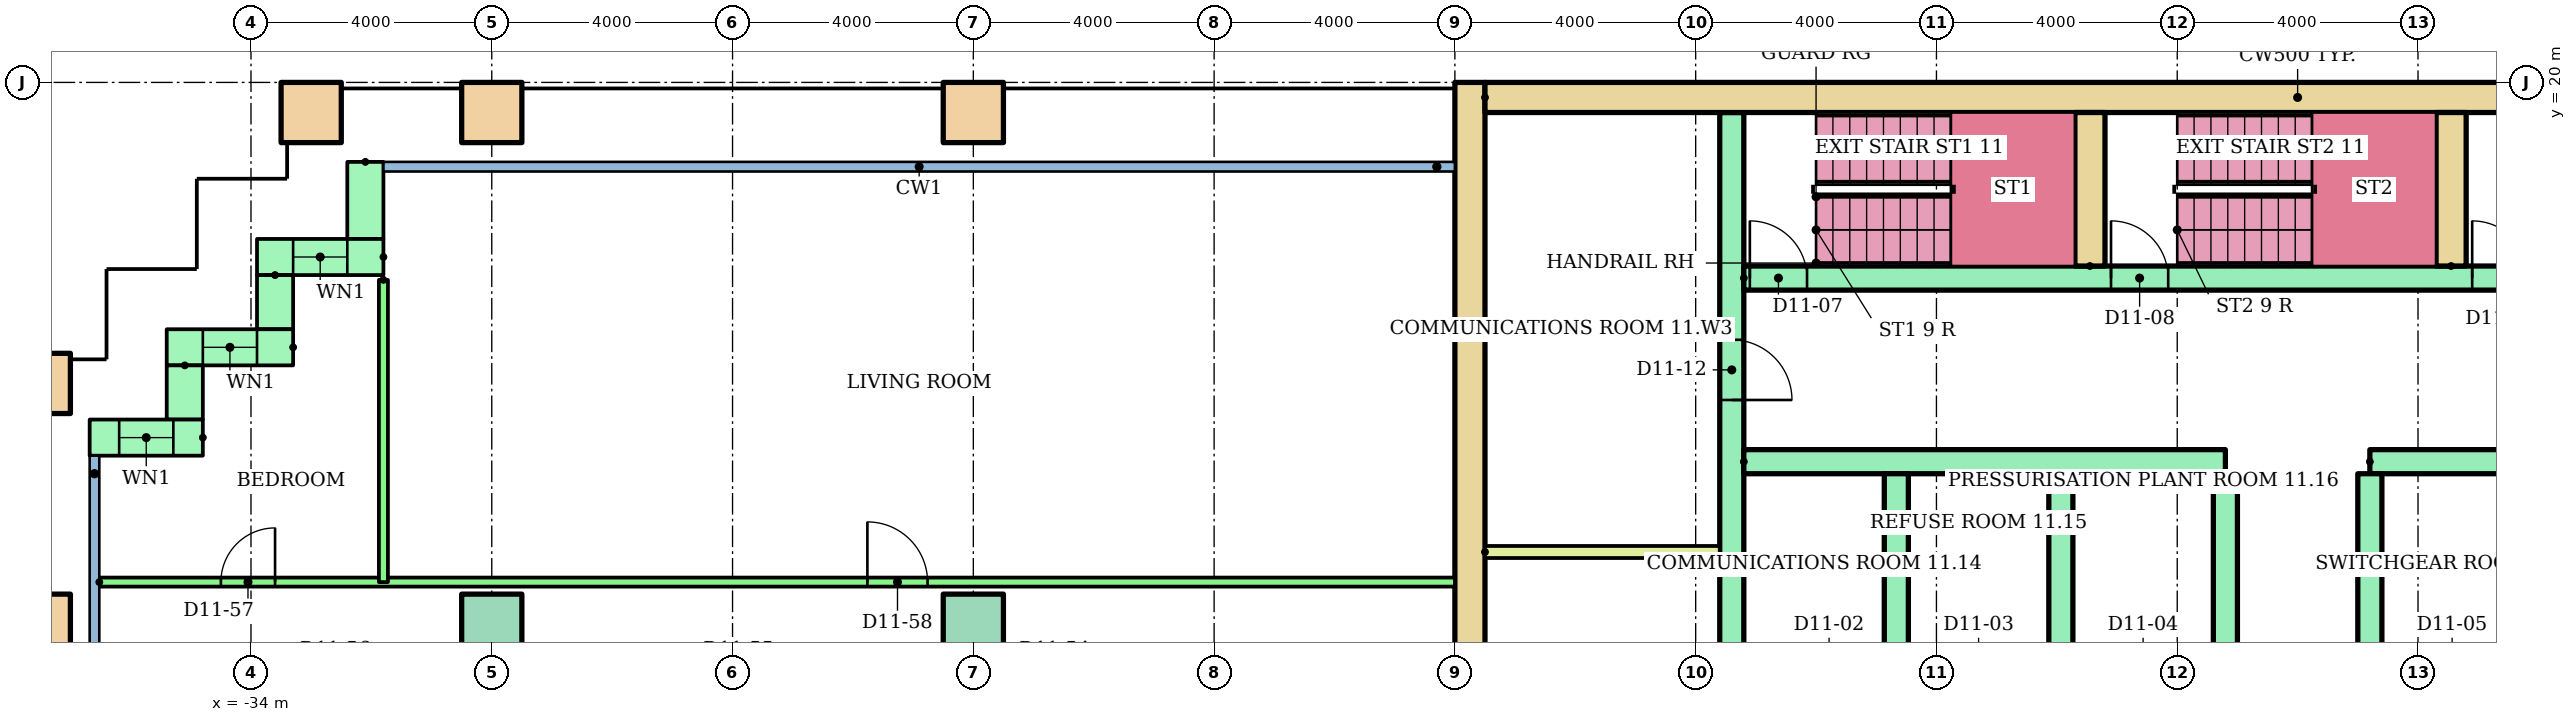
"""IFC4 building model, lengths in metres.
Left out: names, types, materials, properties, quantities, classifications, styles, units other than length and angle.
Written with IfcOpenShell. Run it as: python <this file> out.ifc"""

import sys

from ifc_helpers import new_model, si_unit, direction, frame, frame_2d, origin, origin_2d, place, context, subcontext, project, spatial, rectangle, hollow_rectangle, extrude, element, fill, save


model = new_model("IFC4")
c1 = context("Model", 3, precision=1e-05, world=origin(), true_north=direction((0.0, 1.0)))
c2 = subcontext(c1, "Body", "Model", "MODEL_VIEW")
j1 = project(units=[si_unit("LENGTHUNIT", "METRE"), si_unit("PLANEANGLEUNIT", "RADIAN")], contexts=[c1])
p1 = place(None, origin())
s1 = spatial("IfcSite", under=j1, at=p1, CompositionType="ELEMENT")
p2 = place(p1, origin())
s2 = spatial("IfcBuilding", under=s1, at=p2, CompositionType="ELEMENT")
p3 = place(p2, frame((0.0, 0.0, 44.8)))
s3 = spatial("IfcBuildingStorey", under=s2, at=p3, CompositionType="ELEMENT", Elevation=44.8)
p4 = place(p3, frame((-37.5, 11.0, 0.0)))
e1 = element("IfcColumn", 1, at=p4, inside=s3, PredefinedType="COLUMN", context=c2, shape_type="SweptSolid", body=[
    extrude(hollow_rectangle(XDim=1.0, YDim=1.0, WallThickness=0.05, at=origin_2d()), origin(), (0.0, 0.0, 1.0), 3.2),
])
for number, where in (
    (2, (-30.0, 11.0, 0.0)),
    (3, (-22.0, 11.0, 0.0)),
):
    element("IfcColumn", number, at=place(p3, frame(where)), inside=s3, PredefinedType="COLUMN", context=c2, shape_type="SweptSolid", body=[
        extrude(rectangle(XDim=1.0, YDim=1.0, at=origin_2d()), origin(), (0.0, 0.0, 1.0), 3.2),
    ])
for number, where in (
    (4, (-37.5, 15.0, 0.0)),
    (5, (-33.0, 19.5, 0.0)),
    (6, (-30.0, 19.5, 0.0)),
    (7, (-22.0, 19.5, 0.0)),
):
    element("IfcColumn", number, at=place(p3, frame(where)), inside=s3, PredefinedType="COLUMN", context=c2, shape_type="SweptSolid", body=[
        extrude(hollow_rectangle(XDim=1.0, YDim=1.0, WallThickness=0.05, at=origin_2d()), origin(), (0.0, 0.0, 1.0), 3.2),
    ])
p5 = place(p3, frame((-32.1, 18.68, 0.0), z_axis=(0.0, 0.0, 1.0), x_axis=(0.0, -1.0, 0.0)))
e8 = element("IfcWall", 8, at=p5, inside=s3, PredefinedType="STANDARD", context=c2, shape_type="SweptSolid", body=[
    extrude(rectangle(XDim=1.28, YDim=0.6, at=frame_2d((0.64, 0.0))), origin(), (0.0, 0.0, 1.0), 2.92),
])
p6 = place(p3, frame((-31.8, 17.1, 0.0), z_axis=(0.0, 0.0, 1.0), x_axis=(-1.0, 0.0, 0.0)))
e9 = element("IfcWall", 9, at=p6, inside=s3, PredefinedType="STANDARD", context=c2, shape_type="SweptSolid", body=[
    extrude(rectangle(XDim=2.1, YDim=0.6, at=frame_2d((1.05, 0.0))), origin(), (0.0, 0.0, 1.0), 2.92),
])
p7 = place(p6, frame((0.6, 0.0, 0.9)))
e10 = element("IfcOpeningElement", 10, at=p7, cuts=e9, PredefinedType="OPENING", context=c2, shape_type="SweptSolid", body=[
    extrude(rectangle(XDim=0.9, YDim=1.5, at=frame_2d((0.45, 0.75))), frame((0.0, 0.31, 0.0), z_axis=(0.0, -1.0, 0.0), x_axis=(1.0, 0.0, 0.0)), (0.0, 0.0, 1.0), 0.62),
])
p8 = place(p3, frame((-33.6, 16.8, 0.0), z_axis=(0.0, 0.0, 1.0), x_axis=(0.0, -1.0, 0.0)))
e11 = element("IfcWall", 11, at=p8, inside=s3, PredefinedType="STANDARD", context=c2, shape_type="SweptSolid", body=[
    extrude(rectangle(XDim=0.9, YDim=0.6, at=frame_2d((0.45, 0.0))), origin(), (0.0, 0.0, 1.0), 2.92),
])
p9 = place(p3, frame((-33.3, 15.6, 0.0), z_axis=(0.0, 0.0, 1.0), x_axis=(-1.0, 0.0, 0.0)))
e12 = element("IfcWall", 12, at=p9, inside=s3, PredefinedType="STANDARD", context=c2, shape_type="SweptSolid", body=[
    extrude(rectangle(XDim=2.1, YDim=0.6, at=frame_2d((1.05, 0.0))), origin(), (0.0, 0.0, 1.0), 2.92),
])
p10 = place(p9, frame((0.6, 0.0, 0.9)))
e13 = element("IfcOpeningElement", 13, at=p10, cuts=e12, PredefinedType="OPENING", context=c2, shape_type="SweptSolid", body=[
    extrude(rectangle(XDim=0.9, YDim=1.5, at=frame_2d((0.45, 0.75))), frame((0.0, 0.31, 0.0), z_axis=(0.0, -1.0, 0.0), x_axis=(1.0, 0.0, 0.0)), (0.0, 0.0, 1.0), 0.62),
])
p11 = place(p3, frame((-35.1, 15.3, 0.0), z_axis=(0.0, 0.0, 1.0), x_axis=(0.0, -1.0, 0.0)))
e14 = element("IfcWall", 14, at=p11, inside=s3, PredefinedType="STANDARD", context=c2, shape_type="SweptSolid", body=[
    extrude(rectangle(XDim=0.9, YDim=0.6, at=frame_2d((0.45, 0.0))), origin(), (0.0, 0.0, 1.0), 2.92),
])
p12 = place(p3, frame((-34.8, 14.1, 0.0), z_axis=(0.0, 0.0, 1.0), x_axis=(-1.0, 0.0, 0.0)))
e15 = element("IfcWall", 15, at=p12, inside=s3, PredefinedType="STANDARD", context=c2, shape_type="SweptSolid", body=[
    extrude(rectangle(XDim=1.88, YDim=0.6, at=frame_2d((0.94, 0.0))), origin(), (0.0, 0.0, 1.0), 2.92),
])
p13 = place(p12, frame((0.49, 0.0, 0.9)))
e16 = element("IfcOpeningElement", 16, at=p13, cuts=e15, PredefinedType="OPENING", context=c2, shape_type="SweptSolid", body=[
    extrude(rectangle(XDim=0.9, YDim=1.5, at=frame_2d((0.45, 0.75))), frame((0.0, 0.31, 0.0), z_axis=(0.0, -1.0, 0.0), x_axis=(1.0, 0.0, 0.0)), (0.0, 0.0, 1.0), 0.62),
])
p14 = place(p3, frame((-13.75, 3.0, 0.0), z_axis=(0.0, 0.0, 1.0), x_axis=(0.0, 1.0, 0.0)))
e17 = element("IfcWall", 17, at=p14, inside=s3, PredefinedType="SHEAR", context=c2, shape_type="SweptSolid", body=[
    extrude(rectangle(XDim=17.0, YDim=0.5, at=frame_2d((8.5, 0.0))), origin(), (0.0, 0.0, 1.0), 2.92),
])
p15 = place(p3, frame((-13.5, 19.75, 0.0)))
e18 = element("IfcWall", 18, at=p15, inside=s3, PredefinedType="SHEAR", context=c2, shape_type="SweptSolid", body=[
    extrude(rectangle(XDim=27.0, YDim=0.5, at=frame_2d((13.5, 0.0))), origin(), (0.0, 0.0, 1.0), 2.92),
])
p16 = place(p3, frame((-9.4, 6.8, 0.0), z_axis=(0.0, 0.0, 1.0), x_axis=(0.0, 1.0, 0.0)))
e19 = element("IfcWall", 19, at=p16, inside=s3, PredefinedType="SHEAR", context=c2, shape_type="SweptSolid", body=[
    extrude(rectangle(XDim=12.7, YDim=0.4, at=frame_2d((6.35, 0.0))), origin(), (0.0, 0.0, 1.0), 2.92),
])
p17 = place(p16, frame((0.3, 0.0, 0.0)))
e20 = element("IfcOpeningElement", 20, at=p17, cuts=e19, PredefinedType="OPENING", context=c2, shape_type="SweptSolid", body=[
    extrude(rectangle(XDim=1.0, YDim=2.1, at=frame_2d((0.5, 1.05))), frame((0.0, 0.21, 0.0), z_axis=(0.0, -1.0, 0.0), x_axis=(1.0, 0.0, 0.0)), (0.0, 0.0, 1.0), 0.42),
])
p18 = place(p16, frame((2.05, 0.0, 0.0)))
e21 = element("IfcOpeningElement", 21, at=p18, cuts=e19, PredefinedType="OPENING", context=c2, shape_type="SweptSolid", body=[
    extrude(rectangle(XDim=1.0, YDim=2.1, at=frame_2d((0.5, 1.05))), frame((0.0, 0.21, 0.0), z_axis=(0.0, -1.0, 0.0), x_axis=(1.0, 0.0, 0.0)), (0.0, 0.0, 1.0), 0.42),
])
p19 = place(p16, frame((7.925, 0.0, 0.0)))
e22 = element("IfcOpeningElement", 22, at=p19, cuts=e19, PredefinedType="OPENING", context=c2, shape_type="SweptSolid", body=[
    extrude(rectangle(XDim=1.0, YDim=2.1, at=frame_2d((0.5, 1.05))), frame((0.0, 0.21, 0.0), z_axis=(0.0, -1.0, 0.0), x_axis=(1.0, 0.0, 0.0)), (0.0, 0.0, 1.0), 0.42),
])
for number, where in (
    (23, (-9.2, 13.7, 0.0)),
    (24, (1.2, 13.7, 0.0)),
):
    element("IfcWall", number, at=place(p3, frame(where)), inside=s3, PredefinedType="SHEAR", context=c2, shape_type="SweptSolid", body=[
        extrude(rectangle(XDim=8.0, YDim=0.4, at=frame_2d((4.0, 0.0))), origin(), (0.0, 0.0, 1.0), 2.92),
    ])
for number, where, z_axis, x_axis in (
    (25, (-6.667, 10.5, 0.0), (0.0, 0.0, 1.0), (0.0, 1.0, 0.0)),
    (26, (-3.933, 10.5, 0.0), (0.0, 0.0, 1.0), (0.0, 1.0, 0.0)),
    (27, (-1.2, 10.5, 0.0), (0.0, 0.0, 1.0), (0.0, 1.0, 0.0)),
    (28, (1.2, 10.5, 0.0), (0.0, 0.0, 1.0), (0.0, 1.0, 0.0)),
):
    element("IfcWall", number, at=place(p3, frame(where, z_axis=z_axis, x_axis=x_axis)), inside=s3, PredefinedType="SHEAR", context=c2, shape_type="SweptSolid", body=[
        extrude(rectangle(XDim=3.0, YDim=0.4, at=frame_2d((1.5, 0.0))), origin(), (0.0, 0.0, 1.0), 2.92),
    ])
p20 = place(p3, frame((-9.2, 16.75, 0.0)))
e29 = element("IfcWall", 29, at=p20, inside=s3, PredefinedType="SHEAR", context=c2, shape_type="SweptSolid", body=[
    extrude(rectangle(XDim=18.4, YDim=0.4, at=frame_2d((9.2, 0.0))), origin(), (0.0, 0.0, 1.0), 2.92),
])
p21 = place(p20, frame((0.1, 0.0, 0.0)))
e30 = element("IfcOpeningElement", 30, at=p21, cuts=e29, PredefinedType="OPENING", context=c2, shape_type="SweptSolid", body=[
    extrude(rectangle(XDim=0.95, YDim=2.1, at=frame_2d((0.475, 1.05))), frame((0.0, 0.21, 0.0), z_axis=(0.0, -1.0, 0.0), x_axis=(1.0, 0.0, 0.0)), (0.0, 0.0, 1.0), 0.42),
])
p22 = place(p20, frame((6.1, 0.0, 0.0)))
e31 = element("IfcOpeningElement", 31, at=p22, cuts=e29, PredefinedType="OPENING", context=c2, shape_type="SweptSolid", body=[
    extrude(rectangle(XDim=0.95, YDim=2.1, at=frame_2d((0.475, 1.05))), frame((0.0, 0.21, 0.0), z_axis=(0.0, -1.0, 0.0), x_axis=(1.0, 0.0, 0.0)), (0.0, 0.0, 1.0), 0.42),
])
p23 = place(p20, frame((12.1, 0.0, 0.0)))
e32 = element("IfcOpeningElement", 32, at=p23, cuts=e29, PredefinedType="OPENING", context=c2, shape_type="SweptSolid", body=[
    extrude(rectangle(XDim=0.95, YDim=2.1, at=frame_2d((0.475, 1.05))), frame((0.0, 0.21, 0.0), z_axis=(0.0, -1.0, 0.0), x_axis=(1.0, 0.0, 0.0)), (0.0, 0.0, 1.0), 0.42),
])
for number, where, z_axis, x_axis in (
    (33, (-3.45, 16.95, 0.0), (0.0, 0.0, 1.0), (0.0, 1.0, 0.0)),
    (34, (2.55, 16.95, 0.0), (0.0, 0.0, 1.0), (0.0, 1.0, 0.0)),
):
    element("IfcWall", number, at=place(p3, frame(where, z_axis=z_axis, x_axis=x_axis)), inside=s3, PredefinedType="SHEAR", context=c2, shape_type="SweptSolid", body=[
        extrude(rectangle(XDim=2.55, YDim=0.5, at=frame_2d((1.275, 0.0))), origin(), (0.0, 0.0, 1.0), 2.92),
    ])
p24 = place(p3, frame((-13.5, 12.2, 0.0)))
e35 = element("IfcWall", 35, at=p24, inside=s3, PredefinedType="PARTITIONING", context=c2, shape_type="SweptSolid", body=[
    extrude(rectangle(XDim=3.9, YDim=0.2, at=frame_2d((1.95, 0.0))), origin(), (0.0, 0.0, 1.0), 2.92),
])
p25 = place(p3, frame((-36.52, 11.7, 0.0)))
e36 = element("IfcWall", 36, at=p25, inside=s3, PredefinedType="PARTITIONING", context=c2, shape_type="SweptSolid", body=[
    extrude(rectangle(XDim=22.52, YDim=0.15, at=frame_2d((11.26, 0.0))), origin(), (0.0, 0.0, 1.0), 2.4),
])
p26 = place(p25, frame((2.02, 0.0, 0.0)))
e37 = element("IfcOpeningElement", 37, at=p26, cuts=e36, PredefinedType="OPENING", context=c2, shape_type="SweptSolid", body=[
    extrude(rectangle(XDim=0.9, YDim=2.1, at=frame_2d((0.45, 1.05))), frame((0.0, 0.085, 0.0), z_axis=(0.0, -1.0, 0.0), x_axis=(1.0, 0.0, 0.0)), (0.0, 0.0, 1.0), 0.17),
])
p27 = place(p25, frame((12.76, 0.0, 0.0)))
e38 = element("IfcOpeningElement", 38, at=p27, cuts=e36, PredefinedType="OPENING", context=c2, shape_type="SweptSolid", body=[
    extrude(rectangle(XDim=1.0, YDim=2.1, at=frame_2d((0.5, 1.05))), frame((0.0, 0.085, 0.0), z_axis=(0.0, -1.0, 0.0), x_axis=(1.0, 0.0, 0.0)), (0.0, 0.0, 1.0), 0.17),
])
p28 = place(p3, frame((-31.8, 16.72, 0.0), z_axis=(0.0, 0.0, 1.0), x_axis=(0.0, -1.0, 0.0)))
e39 = element("IfcWall", 39, at=p28, inside=s3, PredefinedType="PARTITIONING", context=c2, shape_type="SweptSolid", body=[
    extrude(rectangle(XDim=5.02, YDim=0.15, at=frame_2d((2.51, 0.0))), origin(), (0.0, 0.0, 1.0), 2.4),
])
p29 = place(p7, origin())
e40 = element("IfcWindow", 40, at=p29, inside=s3, PartitioningType="SINGLE_PANEL", PredefinedType="WINDOW", context=c2, shape_type="SweptSolid", body=[
    extrude(rectangle(XDim=0.9, YDim=1.5, at=frame_2d((0.45, 0.75))), frame((0.0, 0.03, 0.0), z_axis=(0.0, -1.0, 0.0), x_axis=(1.0, 0.0, 0.0)), (0.0, 0.0, 1.0), 0.06),
])
fill(e10, e40)
p30 = place(p10, origin())
e41 = element("IfcWindow", 41, at=p30, inside=s3, PartitioningType="SINGLE_PANEL", PredefinedType="WINDOW", context=c2, shape_type="SweptSolid", body=[
    extrude(rectangle(XDim=0.9, YDim=1.5, at=frame_2d((0.45, 0.75))), frame((0.0, 0.03, 0.0), z_axis=(0.0, -1.0, 0.0), x_axis=(1.0, 0.0, 0.0)), (0.0, 0.0, 1.0), 0.06),
])
fill(e13, e41)
p31 = place(p13, origin())
e42 = element("IfcWindow", 42, at=p31, inside=s3, PartitioningType="SINGLE_PANEL", PredefinedType="WINDOW", context=c2, shape_type="SweptSolid", body=[
    extrude(rectangle(XDim=0.9, YDim=1.5, at=frame_2d((0.45, 0.75))), frame((0.0, 0.03, 0.0), z_axis=(0.0, -1.0, 0.0), x_axis=(1.0, 0.0, 0.0)), (0.0, 0.0, 1.0), 0.06),
])
fill(e16, e42)
p32 = place(p21, origin())
e43 = element("IfcDoor", 43, at=p32, inside=s3, OperationType="SINGLE_SWING_LEFT", PredefinedType="DOOR", context=c2, shape_type="SweptSolid", body=[
    extrude(rectangle(XDim=0.95, YDim=2.1, at=frame_2d((0.475, 1.05))), frame((0.0, 0.025, 0.0), z_axis=(0.0, -1.0, 0.0), x_axis=(1.0, 0.0, 0.0)), (0.0, 0.0, 1.0), 0.05),
])
fill(e30, e43)
p33 = place(p22, origin())
e44 = element("IfcDoor", 44, at=p33, inside=s3, OperationType="SINGLE_SWING_LEFT", PredefinedType="DOOR", context=c2, shape_type="SweptSolid", body=[
    extrude(rectangle(XDim=0.95, YDim=2.1, at=frame_2d((0.475, 1.05))), frame((0.0, 0.025, 0.0), z_axis=(0.0, -1.0, 0.0), x_axis=(1.0, 0.0, 0.0)), (0.0, 0.0, 1.0), 0.05),
])
fill(e31, e44)
p34 = place(p23, origin())
e45 = element("IfcDoor", 45, at=p34, inside=s3, OperationType="SINGLE_SWING_LEFT", PredefinedType="DOOR", context=c2, shape_type="SweptSolid", body=[
    extrude(rectangle(XDim=0.95, YDim=2.1, at=frame_2d((0.475, 1.05))), frame((0.0, 0.025, 0.0), z_axis=(0.0, -1.0, 0.0), x_axis=(1.0, 0.0, 0.0)), (0.0, 0.0, 1.0), 0.05),
])
fill(e32, e45)
p35 = place(p19, frame((1.0, 0.0, 0.0), z_axis=(0.0, 0.0, 1.0), x_axis=(-1.0, 0.0, 0.0)))
e46 = element("IfcDoor", 46, at=p35, inside=s3, OperationType="SINGLE_SWING_LEFT", PredefinedType="DOOR", context=c2, shape_type="SweptSolid", body=[
    extrude(rectangle(XDim=1.0, YDim=2.1, at=frame_2d((0.5, 1.05))), frame((0.0, 0.025, 0.0), z_axis=(0.0, -1.0, 0.0), x_axis=(1.0, 0.0, 0.0)), (0.0, 0.0, 1.0), 0.05),
])
fill(e22, e46)
p36 = place(p26, origin())
e47 = element("IfcDoor", 47, at=p36, inside=s3, OperationType="SINGLE_SWING_RIGHT", PredefinedType="DOOR", context=c2, shape_type="SweptSolid", body=[
    extrude(rectangle(XDim=0.9, YDim=2.1, at=frame_2d((0.45, 1.05))), frame((0.0, 0.025, 0.0), z_axis=(0.0, -1.0, 0.0), x_axis=(1.0, 0.0, 0.0)), (0.0, 0.0, 1.0), 0.05),
])
fill(e37, e47)
p37 = place(p27, origin())
e48 = element("IfcDoor", 48, at=p37, inside=s3, OperationType="SINGLE_SWING_LEFT", PredefinedType="DOOR", context=c2, shape_type="SweptSolid", body=[
    extrude(rectangle(XDim=1.0, YDim=2.1, at=frame_2d((0.5, 1.05))), frame((0.0, 0.025, 0.0), z_axis=(0.0, -1.0, 0.0), x_axis=(1.0, 0.0, 0.0)), (0.0, 0.0, 1.0), 0.05),
])
fill(e38, e48)
save(model, sys.argv[1])
